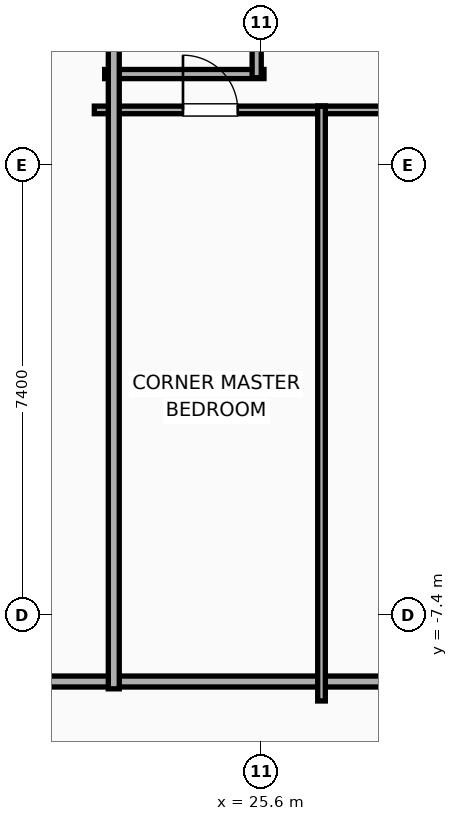
"""IFC4 building model, lengths in metres.
Left out: names, types, materials, properties, quantities, classifications, styles, units other than length and angle.
Written with IfcOpenShell. Run it as: python <this file> out.ifc"""

import sys

from ifc_helpers import new_model, si_unit, direction, frame, frame_2d, origin, place, context, subcontext, project, spatial, rectangle, extrude, element, fill, save


model = new_model("IFC4")
c1 = context("Model", 3, precision=1e-05, world=origin(), true_north=direction((0.0, 1.0)))
c2 = subcontext(c1, "Body", "Model", "MODEL_VIEW")
j1 = project(units=[si_unit("LENGTHUNIT", "METRE"), si_unit("PLANEANGLEUNIT", "RADIAN")], contexts=[c1])
p1 = place(None, origin())
s1 = spatial("IfcSite", under=j1, at=p1, CompositionType="ELEMENT")
p2 = place(p1, origin())
s2 = spatial("IfcBuilding", under=s1, at=p2, CompositionType="ELEMENT")
p3 = place(p2, frame((0.0, 0.0, 113.1)))
s3 = spatial("IfcBuildingStorey", under=s2, at=p3, CompositionType="ELEMENT", Elevation=113.1)
p4 = place(p3, frame((9.88, -8.49, 0.0), z_axis=(0.0, 0.0, 1.0), x_axis=(1.0, 0.0, 0.0)))
e1 = element("IfcWall", 1, at=p4, inside=s3, PredefinedType="PARTITIONING", context=c2, shape_type="SweptSolid", body=[
    extrude(rectangle(XDim=23.33, YDim=0.18, at=frame_2d((11.665, 0.0))), origin(), (0.0, 0.0, 1.0), 3.65),
])
p5 = place(p3, frame((23.02, 1.5, 0.0), z_axis=(0.0, 0.0, 1.0), x_axis=(1.0, 0.0, 0.0)))
e2 = element("IfcWall", 2, at=p5, inside=s3, PredefinedType="PLUMBINGWALL", context=c2, shape_type="SweptSolid", body=[
    extrude(rectangle(XDim=2.62, YDim=0.15, at=frame_2d((1.31, 0.0))), origin(), (0.0, 0.0, 1.0), 3.65),
])
p6 = place(p3, frame((25.52, 1.44, 0.0), z_axis=(0.0, 0.0, 1.0), x_axis=(0.0, 1.0, 0.0)))
e3 = element("IfcWall", 3, at=p6, inside=s3, PredefinedType="PLUMBINGWALL", context=c2, shape_type="SweptSolid", body=[
    extrude(rectangle(XDim=3.12, YDim=0.15, at=frame_2d((1.56, 0.0))), origin(), (0.0, 0.0, 1.0), 3.65),
])
p7 = place(p6, frame((1.11, 0.0, 0.0)))
e4 = element("IfcOpeningElement", 4, at=p7, cuts=e3, PredefinedType="OPENING", context=c2, shape_type="SweptSolid", body=[
    extrude(rectangle(XDim=0.9, YDim=2.05, at=frame_2d((0.45, 1.025))), frame((0.0, 0.085, 0.0), z_axis=(0.0, -1.0, 0.0), x_axis=(1.0, 0.0, 0.0)), (0.0, 0.0, 1.0), 0.17),
])
p8 = place(p3, frame((22.85, 0.91, 0.0), z_axis=(0.0, 0.0, 1.0), x_axis=(1.0, 0.0, 0.0)))
e5 = element("IfcWall", 5, at=p8, inside=s3, PredefinedType="PARTITIONING", context=c2, shape_type="SweptSolid", body=[
    extrude(rectangle(XDim=3.798, YDim=0.125, at=frame_2d((1.899, 0.0))), origin(), (0.0, 0.0, 1.0), 3.65),
])
p9 = place(p8, frame((1.458, 0.0, 0.0)))
e6 = element("IfcOpeningElement", 6, at=p9, cuts=e5, PredefinedType="OPENING", context=c2, shape_type="SweptSolid", body=[
    extrude(rectangle(XDim=0.9, YDim=2.05, at=frame_2d((0.45, 1.025))), frame((0.0, 0.073, 0.0), z_axis=(0.0, -1.0, 0.0), x_axis=(1.0, 0.0, 0.0)), (0.0, 0.0, 1.0), 0.145),
])
p10 = place(p3, frame((26.523, 0.91, 0.0), z_axis=(0.0, 0.0, 1.0), x_axis=(1.0, 0.0, 0.0)))
e7 = element("IfcWall", 7, at=p10, inside=s3, PredefinedType="PARTITIONING", context=c2, shape_type="SweptSolid", body=[
    extrude(rectangle(XDim=3.441, YDim=0.125, at=frame_2d((1.721, 0.0))), origin(), (0.0, 0.0, 1.0), 3.65),
])
p11 = place(p10, frame((1.271, 0.0, 0.0)))
e8 = element("IfcOpeningElement", 8, at=p11, cuts=e7, PredefinedType="OPENING", context=c2, shape_type="SweptSolid", body=[
    extrude(rectangle(XDim=0.9, YDim=2.05, at=frame_2d((0.45, 1.025))), frame((0.0, 0.073, 0.0), z_axis=(0.0, -1.0, 0.0), x_axis=(1.0, 0.0, 0.0)), (0.0, 0.0, 1.0), 0.145),
])
p12 = place(p3, frame((26.586, -8.81, 0.0), z_axis=(0.0, 0.0, 1.0), x_axis=(0.0, 1.0, 0.0)))
e9 = element("IfcWall", 9, at=p12, inside=s3, PredefinedType="PARTITIONING", context=c2, shape_type="SweptSolid", body=[
    extrude(rectangle(XDim=9.78, YDim=0.125, at=frame_2d((4.89, 0.0))), origin(), (0.0, 0.0, 1.0), 3.65),
])
p13 = place(p3, frame((23.17, -8.61, 0.0), z_axis=(0.0, 0.0, 1.0), x_axis=(0.0, 1.0, 0.0)))
e10 = element("IfcWall", 10, at=p13, inside=s3, PredefinedType="PARTITIONING", context=c2, shape_type="SweptSolid", body=[
    extrude(rectangle(XDim=17.22, YDim=0.18, at=frame_2d((8.61, 0.0))), origin(), (0.0, 0.0, 1.0), 3.65),
])
p14 = place(p9, origin())
e11 = element("IfcDoor", 11, at=p14, inside=s3, OperationType="SINGLE_SWING_LEFT", PredefinedType="DOOR", context=c2, shape_type="SweptSolid", body=[
    extrude(rectangle(XDim=0.9, YDim=2.05, at=frame_2d((0.45, 1.025))), frame((0.0, 0.025, 0.0), z_axis=(0.0, -1.0, 0.0), x_axis=(1.0, 0.0, 0.0)), (0.0, 0.0, 1.0), 0.05),
])
fill(e6, e11)
save(model, sys.argv[1])
